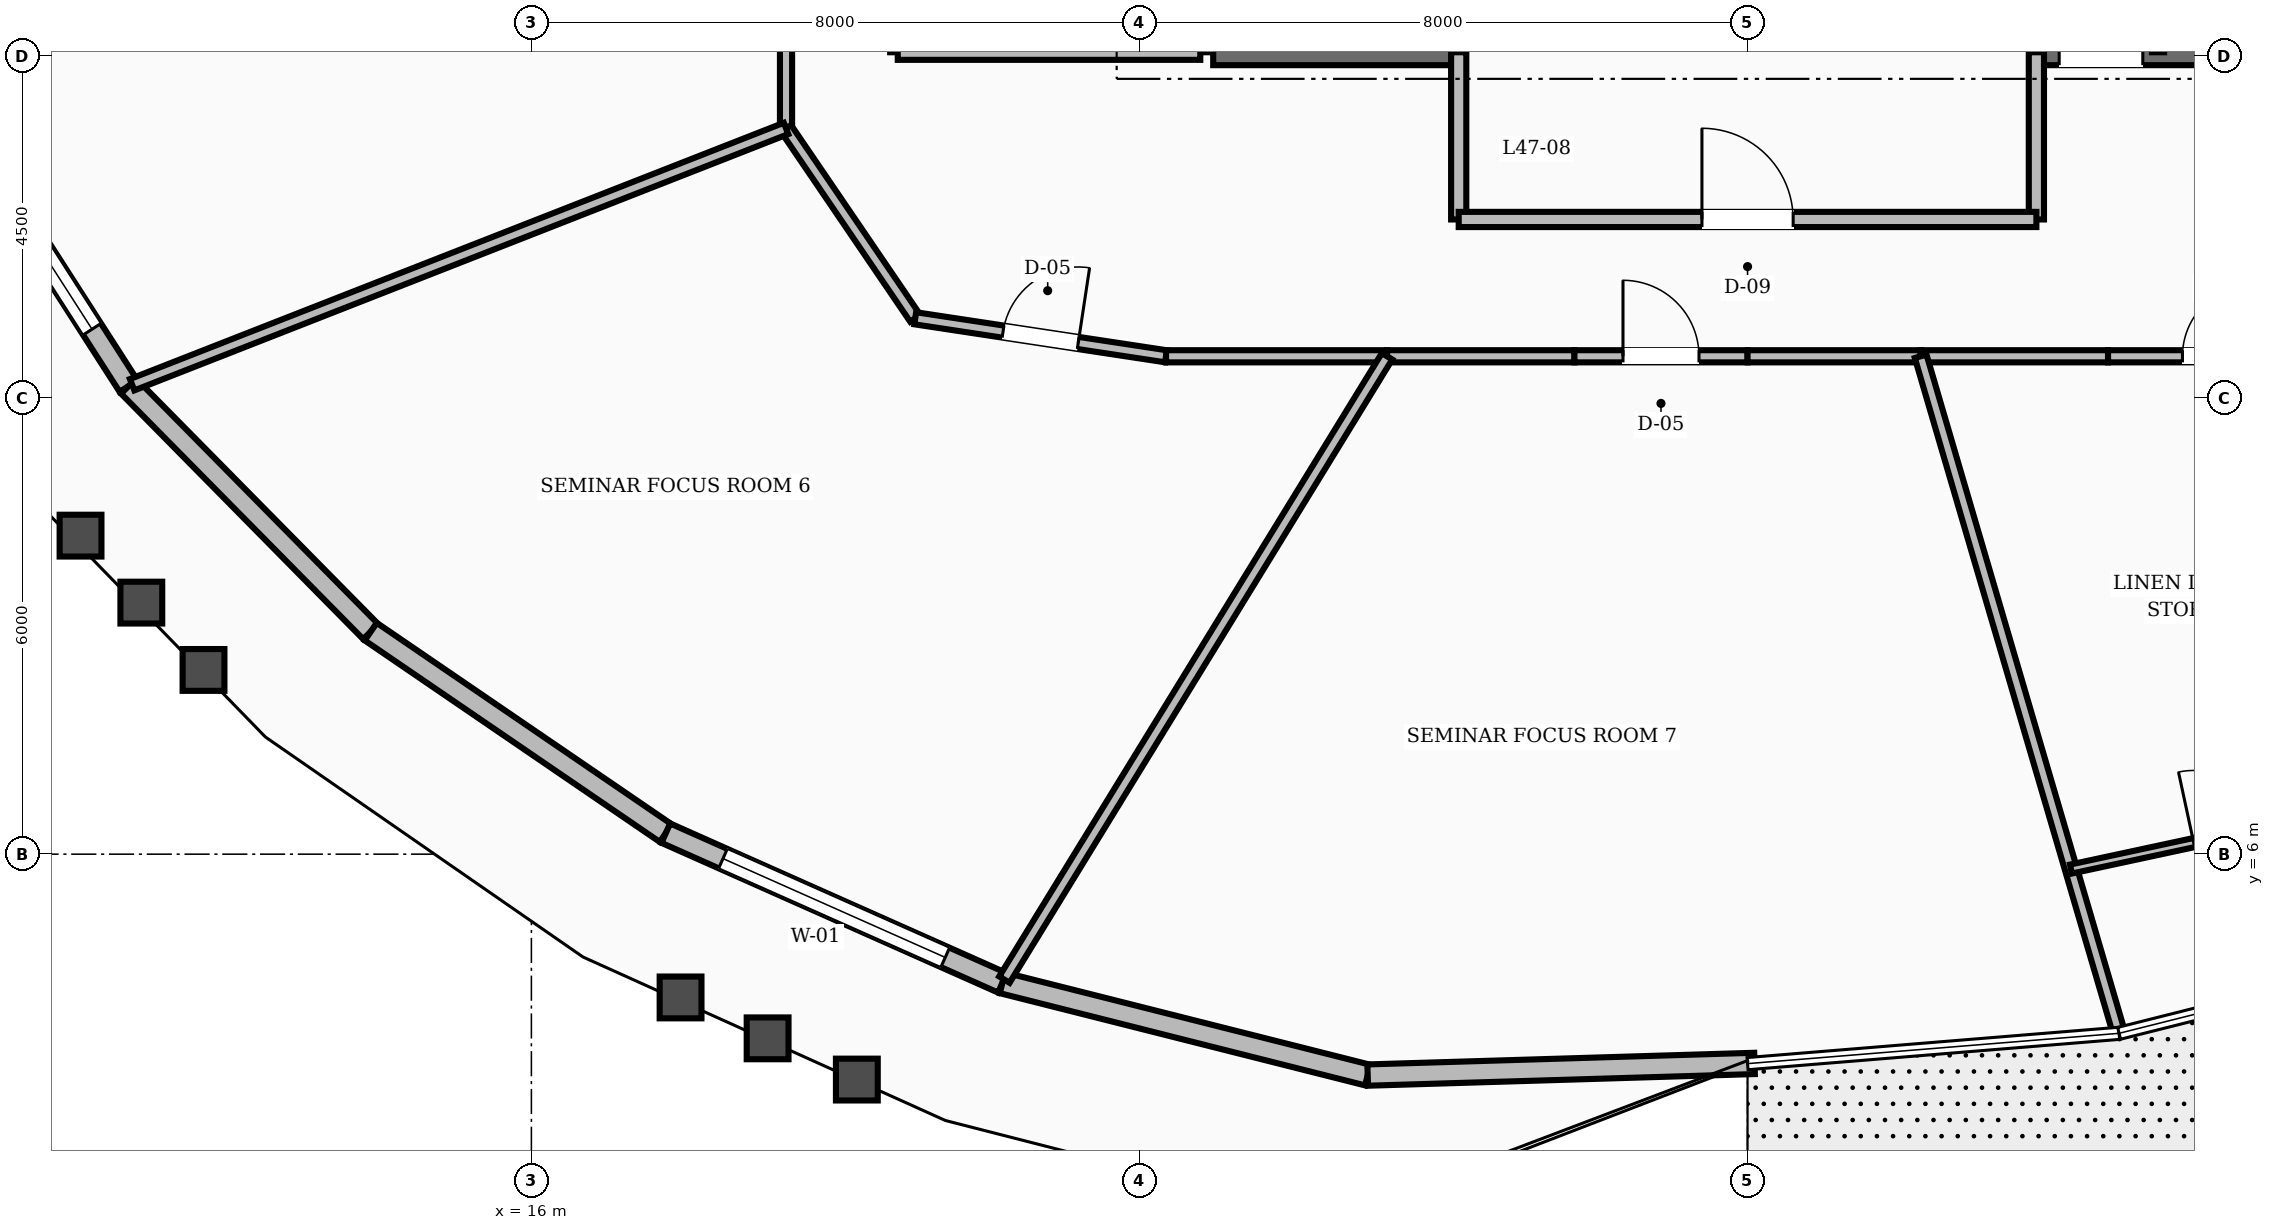
"""IFC4 building model, lengths in metres.
Left out: names, types, materials, properties, quantities, classifications, styles, units other than length and angle.
Written with IfcOpenShell. Run it as: python <this file> out.ifc"""

import sys

from ifc_helpers import new_model, si_unit, direction, frame, frame_2d, origin, place, context, subcontext, project, spatial, rectangle, extrude, element, fill, save


model = new_model("IFC4")
c1 = context("Model", 3, precision=1e-05, world=origin(), true_north=direction((0.0, 1.0)))
c2 = subcontext(c1, "Body", "Model", "MODEL_VIEW")
j1 = project(units=[si_unit("LENGTHUNIT", "METRE"), si_unit("PLANEANGLEUNIT", "RADIAN")], contexts=[c1])
p1 = place(None, origin())
s1 = spatial("IfcSite", under=j1, at=p1, CompositionType="ELEMENT")
p2 = place(p1, origin())
s2 = spatial("IfcBuilding", under=s1, at=p2, CompositionType="ELEMENT")
p3 = place(p2, frame((0.0, 0.0, 182.0)))
s3 = spatial("IfcBuildingStorey", under=s2, at=p3, CompositionType="ELEMENT", Elevation=182.0)
p4 = place(p3, frame((24.97, 16.55, 0.0), z_axis=(0.0, 0.0, 1.0), x_axis=(1.0, 0.0, 0.0)))
e1 = element("IfcWall", 1, at=p4, inside=s3, PredefinedType="SHEAR", context=c2, shape_type="SweptSolid", body=[
    extrude(rectangle(XDim=3.23, YDim=0.34, at=frame_2d((1.615, 0.0))), origin(), (0.0, 0.0, 1.0), 3.6),
])
p5 = place(p3, frame((35.8, 16.55, 0.0), z_axis=(0.0, 0.0, 1.0), x_axis=(1.0, 0.0, 0.0)))
e2 = element("IfcWall", 2, at=p5, inside=s3, PredefinedType="SHEAR", context=c2, shape_type="SweptSolid", body=[
    extrude(rectangle(XDim=3.23, YDim=0.34, at=frame_2d((1.615, 0.0))), origin(), (0.0, 0.0, 1.0), 3.6),
])
p6 = place(p5, frame((0.3, 0.0, 0.0)))
e3 = element("IfcOpeningElement", 3, at=p6, cuts=e2, PredefinedType="OPENING", context=c2, shape_type="SweptSolid", body=[
    extrude(rectangle(XDim=1.1, YDim=2.1, at=frame_2d((0.55, 1.05))), frame((0.0, 0.18, 0.0), z_axis=(0.0, -1.0, 0.0), x_axis=(1.0, 0.0, 0.0)), (0.0, 0.0, 1.0), 0.36),
])
p7 = place(p3, frame((8.334, 15.843, 0.0), z_axis=(0.0, 0.0, 1.0), x_axis=(0.54047019892, -0.841363158261, 0.0)))
e4 = element("IfcWall", 4, at=p7, inside=s3, PredefinedType="STANDARD", context=c2, shape_type="SweptSolid", body=[
    extrude(rectangle(XDim=4.38, YDim=0.28, at=frame_2d((2.19, 0.0))), origin(), (0.0, 0.0, 1.0), 2.82),
])
p8 = place(p7, frame((0.89, 0.0, 0.8)))
e5 = element("IfcOpeningElement", 5, at=p8, cuts=e4, PredefinedType="OPENING", context=c2, shape_type="SweptSolid", body=[
    extrude(rectangle(XDim=2.6, YDim=1.65, at=frame_2d((1.3, 0.825))), frame((0.0, 0.15, 0.0), z_axis=(0.0, -1.0, 0.0), x_axis=(1.0, 0.0, 0.0)), (0.0, 0.0, 1.0), 0.3),
])
p9 = place(p3, frame((10.701, 12.158, 0.0), z_axis=(0.0, 0.0, 1.0), x_axis=(0.70219293187, -0.711986717876, 0.0)))
e6 = element("IfcWall", 6, at=p9, inside=s3, PredefinedType="STANDARD", context=c2, shape_type="SweptSolid", body=[
    extrude(rectangle(XDim=4.537, YDim=0.28, at=frame_2d((2.269, 0.0))), origin(), (0.0, 0.0, 1.0), 2.82),
])
p10 = place(p3, frame((13.887, 8.927, 0.0), z_axis=(0.0, 0.0, 1.0), x_axis=(0.825797441916, -0.563966829632, 0.0)))
e7 = element("IfcWall", 7, at=p10, inside=s3, PredefinedType="STANDARD", context=c2, shape_type="SweptSolid", body=[
    extrude(rectangle(XDim=4.7, YDim=0.28, at=frame_2d((2.35, 0.0))), origin(), (0.0, 0.0, 1.0), 2.82),
])
p11 = place(p3, frame((17.768, 6.277, 0.0), z_axis=(0.0, 0.0, 1.0), x_axis=(0.913703507389, -0.406381471754, 0.0)))
e8 = element("IfcWall", 8, at=p11, inside=s3, PredefinedType="STANDARD", context=c2, shape_type="SweptSolid", body=[
    extrude(rectangle(XDim=4.847, YDim=0.28, at=frame_2d((2.423, 0.0))), origin(), (0.0, 0.0, 1.0), 2.82),
])
p12 = place(p11, frame((0.823, 0.0, 0.8)))
e9 = element("IfcOpeningElement", 9, at=p12, cuts=e8, PredefinedType="OPENING", context=c2, shape_type="SweptSolid", body=[
    extrude(rectangle(XDim=3.2, YDim=1.65, at=frame_2d((1.6, 0.825))), frame((0.0, 0.15, 0.0), z_axis=(0.0, -1.0, 0.0), x_axis=(1.0, 0.0, 0.0)), (0.0, 0.0, 1.0), 0.3),
])
p13 = place(p3, frame((22.197, 4.307, 0.0), z_axis=(0.0, 0.0, 1.0), x_axis=(0.96958067748, -0.244771954803, 0.0)))
e10 = element("IfcWall", 10, at=p13, inside=s3, PredefinedType="STANDARD", context=c2, shape_type="SweptSolid", body=[
    extrude(rectangle(XDim=4.956, YDim=0.28, at=frame_2d((2.478, 0.0))), origin(), (0.0, 0.0, 1.0), 2.82),
])
p14 = place(p3, frame((27.002, 3.094, 0.0), z_axis=(0.0, 0.0, 1.0), x_axis=(0.999546573707, 0.030110579378, 0.0)))
e11 = element("IfcWall", 11, at=p14, inside=s3, PredefinedType="STANDARD", context=c2, shape_type="SweptSolid", body=[
    extrude(rectangle(XDim=5.092, YDim=0.28, at=frame_2d((2.546, 0.0))), origin(), (0.0, 0.0, 1.0), 2.82),
])
p15 = place(p3, frame((20.82, 16.55, 0.0), z_axis=(0.0, 0.0, 1.0), x_axis=(1.0, 0.0, 0.0)))
e12 = element("IfcWall", 12, at=p15, inside=s3, PredefinedType="SOLIDWALL", context=c2, shape_type="SweptSolid", body=[
    extrude(rectangle(XDim=3.98, YDim=0.2, at=frame_2d((1.99, 0.0))), origin(), (0.0, 0.0, 1.0), 2.8),
])
for number, where, z_axis, x_axis in (
    (13, (28.2, 14.35, 0.0), (0.0, 0.0, 1.0), (0.0, 1.0, 0.0)),
    (14, (35.8, 14.35, 0.0), (0.0, 0.0, 1.0), (0.0, 1.0, 0.0)),
):
    element("IfcWall", number, at=place(p3, frame(where, z_axis=z_axis, x_axis=x_axis)), inside=s3, PredefinedType="SOLIDWALL", context=c2, shape_type="SweptSolid", body=[
        extrude(rectangle(XDim=2.2, YDim=0.2, at=frame_2d((1.1, 0.0))), origin(), (0.0, 0.0, 1.0), 2.8),
    ])
p16 = place(p3, frame((28.2, 14.35, 0.0), z_axis=(0.0, 0.0, 1.0), x_axis=(1.0, 0.0, 0.0)))
e15 = element("IfcWall", 15, at=p16, inside=s3, PredefinedType="SOLIDWALL", context=c2, shape_type="SweptSolid", body=[
    extrude(rectangle(XDim=7.6, YDim=0.2, at=frame_2d((3.8, 0.0))), origin(), (0.0, 0.0, 1.0), 2.8),
])
p17 = place(p16, frame((3.2, 0.0, 0.0)))
e16 = element("IfcOpeningElement", 16, at=p17, cuts=e15, PredefinedType="OPENING", context=c2, shape_type="SweptSolid", body=[
    extrude(rectangle(XDim=1.2, YDim=2.1, at=frame_2d((0.6, 1.05))), frame((0.0, 0.11, 0.0), z_axis=(0.0, -1.0, 0.0), x_axis=(1.0, 0.0, 0.0)), (0.0, 0.0, 1.0), 0.22),
])
p18 = place(p3, frame((19.35, 18.76, 0.0), z_axis=(0.0, 0.0, 1.0), x_axis=(0.0, -1.0, 0.0)))
e17 = element("IfcWall", 17, at=p18, inside=s3, PredefinedType="SOLIDWALL", context=c2, shape_type="SweptSolid", body=[
    extrude(rectangle(XDim=3.213, YDim=0.16, at=frame_2d((1.606, 0.0))), origin(), (0.0, 0.0, 1.0), 2.8),
])
p19 = place(p3, frame((19.35, 15.548, 0.0), z_axis=(0.0, 0.0, 1.0), x_axis=(0.562674669208, -0.826678423955, 0.0)))
e18 = element("IfcWall", 18, at=p19, inside=s3, PredefinedType="SOLIDWALL", context=c2, shape_type="SweptSolid", body=[
    extrude(rectangle(XDim=3.021, YDim=0.16, at=frame_2d((1.511, 0.0))), origin(), (0.0, 0.0, 1.0), 2.8),
])
p20 = place(p3, frame((21.05, 13.05, 0.0), z_axis=(0.0, 0.0, 1.0), x_axis=(0.988710906508, -0.149835721217, 0.0)))
e19 = element("IfcWall", 19, at=p20, inside=s3, PredefinedType="SOLIDWALL", context=c2, shape_type="SweptSolid", body=[
    extrude(rectangle(XDim=3.337, YDim=0.16, at=frame_2d((1.668, 0.0))), origin(), (0.0, 0.0, 1.0), 2.8),
])
p21 = place(p20, frame((1.168, 0.0, 0.0)))
e20 = element("IfcOpeningElement", 20, at=p21, cuts=e19, PredefinedType="OPENING", context=c2, shape_type="SweptSolid", body=[
    extrude(rectangle(XDim=1.0, YDim=2.1, at=frame_2d((0.5, 1.05))), frame((0.0, 0.09, 0.0), z_axis=(0.0, -1.0, 0.0), x_axis=(1.0, 0.0, 0.0)), (0.0, 0.0, 1.0), 0.18),
])
p22 = place(p3, frame((24.349, 12.55, 0.0), z_axis=(0.0, 0.0, 1.0), x_axis=(1.0, 0.0, 0.0)))
e21 = element("IfcWall", 21, at=p22, inside=s3, PredefinedType="SOLIDWALL", context=c2, shape_type="SweptSolid", body=[
    extrude(rectangle(XDim=2.908, YDim=0.16, at=frame_2d((1.454, 0.0))), origin(), (0.0, 0.0, 1.0), 2.8),
])
p23 = place(p3, frame((27.257, 12.55, 0.0), z_axis=(0.0, 0.0, 1.0), x_axis=(1.0, 0.0, 0.0)))
e22 = element("IfcWall", 22, at=p23, inside=s3, PredefinedType="SOLIDWALL", context=c2, shape_type="SweptSolid", body=[
    extrude(rectangle(XDim=2.465, YDim=0.16, at=frame_2d((1.232, 0.0))), origin(), (0.0, 0.0, 1.0), 2.8),
])
p24 = place(p3, frame((29.722, 12.55, 0.0), z_axis=(0.0, 0.0, 1.0), x_axis=(1.0, 0.0, 0.0)))
e23 = element("IfcWall", 23, at=p24, inside=s3, PredefinedType="SOLIDWALL", context=c2, shape_type="SweptSolid", body=[
    extrude(rectangle(XDim=2.278, YDim=0.16, at=frame_2d((1.139, 0.0))), origin(), (0.0, 0.0, 1.0), 2.8),
])
p25 = place(p24, frame((0.639, 0.0, 0.0)))
e24 = element("IfcOpeningElement", 24, at=p25, cuts=e23, PredefinedType="OPENING", context=c2, shape_type="SweptSolid", body=[
    extrude(rectangle(XDim=1.0, YDim=2.1, at=frame_2d((0.5, 1.05))), frame((0.0, 0.09, 0.0), z_axis=(0.0, -1.0, 0.0), x_axis=(1.0, 0.0, 0.0)), (0.0, 0.0, 1.0), 0.18),
])
p26 = place(p3, frame((32.0, 12.55, 0.0), z_axis=(0.0, 0.0, 1.0), x_axis=(1.0, 0.0, 0.0)))
e25 = element("IfcWall", 25, at=p26, inside=s3, PredefinedType="SOLIDWALL", context=c2, shape_type="SweptSolid", body=[
    extrude(rectangle(XDim=2.278, YDim=0.16, at=frame_2d((1.139, 0.0))), origin(), (0.0, 0.0, 1.0), 2.8),
])
p27 = place(p3, frame((34.278, 12.55, 0.0), z_axis=(0.0, 0.0, 1.0), x_axis=(1.0, 0.0, 0.0)))
e26 = element("IfcWall", 26, at=p27, inside=s3, PredefinedType="SOLIDWALL", context=c2, shape_type="SweptSolid", body=[
    extrude(rectangle(XDim=2.465, YDim=0.16, at=frame_2d((1.232, 0.0))), origin(), (0.0, 0.0, 1.0), 2.8),
])
p28 = place(p3, frame((36.743, 12.55, 0.0), z_axis=(0.0, 0.0, 1.0), x_axis=(1.0, 0.0, 0.0)))
e27 = element("IfcWall", 27, at=p28, inside=s3, PredefinedType="SOLIDWALL", context=c2, shape_type="SweptSolid", body=[
    extrude(rectangle(XDim=2.908, YDim=0.16, at=frame_2d((1.454, 0.0))), origin(), (0.0, 0.0, 1.0), 2.8),
])
p29 = place(p28, frame((0.979, 0.0, 0.0)))
e28 = element("IfcOpeningElement", 28, at=p29, cuts=e27, PredefinedType="OPENING", context=c2, shape_type="SweptSolid", body=[
    extrude(rectangle(XDim=0.95, YDim=2.1, at=frame_2d((0.475, 1.05))), frame((0.0, 0.09, 0.0), z_axis=(0.0, -1.0, 0.0), x_axis=(1.0, 0.0, 0.0)), (0.0, 0.0, 1.0), 0.18),
])
p30 = place(p3, frame((19.35, 15.548, 0.0), z_axis=(0.0, 0.0, 1.0), x_axis=(-0.931036402204, -0.364926318278, 0.0)))
e29 = element("IfcWall", 29, at=p30, inside=s3, PredefinedType="SOLIDWALL", context=c2, shape_type="SweptSolid", body=[
    extrude(rectangle(XDim=9.24, YDim=0.16, at=frame_2d((4.62, 0.0))), origin(), (0.0, 0.0, 1.0), 2.8),
])
p31 = place(p3, frame((27.257, 12.55, 0.0), z_axis=(0.0, 0.0, 1.0), x_axis=(-0.523144397067, -0.85224406118, 0.0)))
e30 = element("IfcWall", 30, at=p31, inside=s3, PredefinedType="SOLIDWALL", context=c2, shape_type="SweptSolid", body=[
    extrude(rectangle(XDim=9.623, YDim=0.16, at=frame_2d((4.811, 0.0))), origin(), (0.0, 0.0, 1.0), 2.8),
])
p32 = place(p3, frame((34.278, 12.55, 0.0), z_axis=(0.0, 0.0, 1.0), x_axis=(0.281249860715, -0.959634574121, 0.0)))
e31 = element("IfcWall", 31, at=p32, inside=s3, PredefinedType="SOLIDWALL", context=c2, shape_type="SweptSolid", body=[
    extrude(rectangle(XDim=9.232, YDim=0.16, at=frame_2d((4.616, 0.0))), origin(), (0.0, 0.0, 1.0), 2.8),
])
p33 = place(p3, frame((36.255, 5.804, 0.0), z_axis=(0.0, 0.0, 1.0), x_axis=(0.977643362971, 0.210269957053, 0.0)))
e32 = element("IfcWall", 32, at=p33, inside=s3, PredefinedType="PARTITIONING", context=c2, shape_type="SweptSolid", body=[
    extrude(rectangle(XDim=4.253, YDim=0.12, at=frame_2d((2.126, 0.0))), origin(), (0.0, 0.0, 1.0), 2.8),
])
p34 = place(p33, frame((1.652, 0.0, 0.0)))
e33 = element("IfcOpeningElement", 33, at=p34, cuts=e32, PredefinedType="OPENING", context=c2, shape_type="SweptSolid", body=[
    extrude(rectangle(XDim=0.95, YDim=2.1, at=frame_2d((0.475, 1.05))), frame((0.0, 0.07, 0.0), z_axis=(0.0, -1.0, 0.0), x_axis=(1.0, 0.0, 0.0)), (0.0, 0.0, 1.0), 0.14),
])
p35 = place(p8, origin())
e34 = element("IfcWindow", 34, at=p35, inside=s3, PartitioningType="SINGLE_PANEL", PredefinedType="WINDOW", context=c2, shape_type="SweptSolid", body=[
    extrude(rectangle(XDim=2.6, YDim=1.65, at=frame_2d((1.3, 0.825))), frame((0.0, 0.03, 0.0), z_axis=(0.0, -1.0, 0.0), x_axis=(1.0, 0.0, 0.0)), (0.0, 0.0, 1.0), 0.06),
])
fill(e5, e34)
p36 = place(p12, origin())
e35 = element("IfcWindow", 35, at=p36, inside=s3, PartitioningType="SINGLE_PANEL", PredefinedType="WINDOW", context=c2, shape_type="SweptSolid", body=[
    extrude(rectangle(XDim=3.2, YDim=1.65, at=frame_2d((1.6, 0.825))), frame((0.0, 0.03, 0.0), z_axis=(0.0, -1.0, 0.0), x_axis=(1.0, 0.0, 0.0)), (0.0, 0.0, 1.0), 0.06),
])
fill(e9, e35)
p37 = place(p6, origin())
e36 = element("IfcDoor", 36, at=p37, inside=s3, OperationType="SINGLE_SWING_RIGHT", PredefinedType="DOOR", context=c2, shape_type="SweptSolid", body=[
    extrude(rectangle(XDim=1.1, YDim=2.1, at=frame_2d((0.55, 1.05))), frame((0.0, 0.025, 0.0), z_axis=(0.0, -1.0, 0.0), x_axis=(1.0, 0.0, 0.0)), (0.0, 0.0, 1.0), 0.05),
])
fill(e3, e36)
p38 = place(p17, origin())
e37 = element("IfcDoor", 37, at=p38, inside=s3, OperationType="SINGLE_SWING_LEFT", PredefinedType="DOOR", context=c2, shape_type="SweptSolid", body=[
    extrude(rectangle(XDim=1.2, YDim=2.1, at=frame_2d((0.6, 1.05))), frame((0.0, 0.025, 0.0), z_axis=(0.0, -1.0, 0.0), x_axis=(1.0, 0.0, 0.0)), (0.0, 0.0, 1.0), 0.05),
])
fill(e16, e37)
p39 = place(p21, origin())
e38 = element("IfcDoor", 38, at=p39, inside=s3, OperationType="SINGLE_SWING_RIGHT", PredefinedType="DOOR", context=c2, shape_type="SweptSolid", body=[
    extrude(rectangle(XDim=1.0, YDim=2.1, at=frame_2d((0.5, 1.05))), frame((0.0, 0.025, 0.0), z_axis=(0.0, -1.0, 0.0), x_axis=(1.0, 0.0, 0.0)), (0.0, 0.0, 1.0), 0.05),
])
fill(e20, e38)
p40 = place(p25, origin())
e39 = element("IfcDoor", 39, at=p40, inside=s3, OperationType="SINGLE_SWING_LEFT", PredefinedType="DOOR", context=c2, shape_type="SweptSolid", body=[
    extrude(rectangle(XDim=1.0, YDim=2.1, at=frame_2d((0.5, 1.05))), frame((0.0, 0.025, 0.0), z_axis=(0.0, -1.0, 0.0), x_axis=(1.0, 0.0, 0.0)), (0.0, 0.0, 1.0), 0.05),
])
fill(e24, e39)
p41 = place(p29, origin())
e40 = element("IfcDoor", 40, at=p41, inside=s3, OperationType="SINGLE_SWING_RIGHT", PredefinedType="DOOR", context=c2, shape_type="SweptSolid", body=[
    extrude(rectangle(XDim=0.95, YDim=2.1, at=frame_2d((0.475, 1.05))), frame((0.0, 0.025, 0.0), z_axis=(0.0, -1.0, 0.0), x_axis=(1.0, 0.0, 0.0)), (0.0, 0.0, 1.0), 0.05),
])
fill(e28, e40)
p42 = place(p34, origin())
e41 = element("IfcDoor", 41, at=p42, inside=s3, OperationType="SINGLE_SWING_LEFT", PredefinedType="DOOR", context=c2, shape_type="SweptSolid", body=[
    extrude(rectangle(XDim=0.95, YDim=2.1, at=frame_2d((0.475, 1.05))), frame((0.0, 0.025, 0.0), z_axis=(0.0, -1.0, 0.0), x_axis=(1.0, 0.0, 0.0)), (0.0, 0.0, 1.0), 0.05),
])
fill(e33, e41)
save(model, sys.argv[1])
